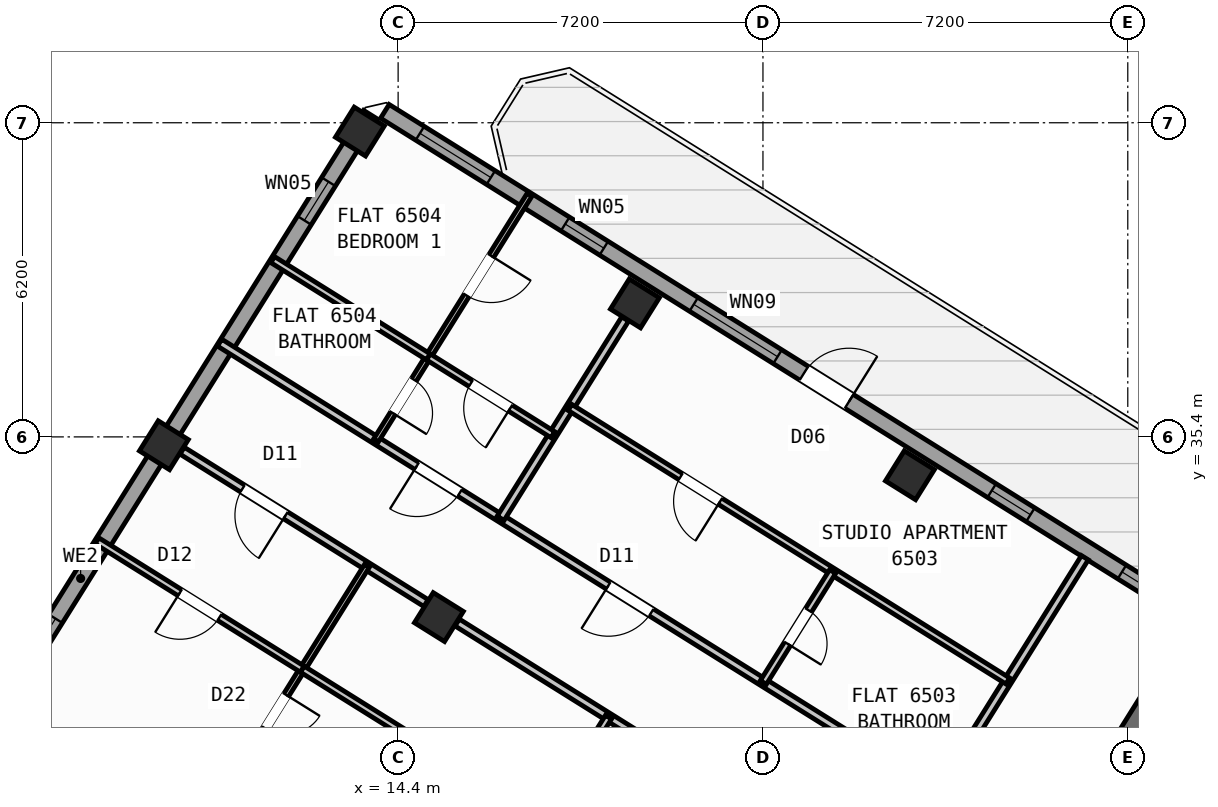
"""IFC4 building model, lengths in metres.
Left out: names, types, materials, properties, quantities, classifications, styles, units other than length and angle.
Written with IfcOpenShell. Run it as: python <this file> out.ifc"""

import sys

from ifc_helpers import new_model, si_unit, direction, frame, frame_2d, origin, origin_2d, place, context, subcontext, project, spatial, rectangle, hollow_rectangle, extrude, source, transform, mapped, element, fill, save


model = new_model("IFC4")
c1 = context("Model", 3, precision=1e-05, world=origin(), true_north=direction((0.0, 1.0)))
c2 = subcontext(c1, "Body", "Model", "MODEL_VIEW")
j1 = project(units=[si_unit("LENGTHUNIT", "METRE"), si_unit("PLANEANGLEUNIT", "RADIAN")], contexts=[c1])
p1 = place(None, origin())
s1 = spatial("IfcSite", under=j1, at=p1, CompositionType="ELEMENT")
p2 = place(p1, origin())
s2 = spatial("IfcBuilding", under=s1, at=p2, CompositionType="ELEMENT")
p3 = place(p2, frame((0.0, 0.0, 259.2)))
s3 = spatial("IfcBuildingStorey", under=s2, at=p3, CompositionType="ELEMENT", Elevation=259.2)
p4 = place(p3, frame((29.544, 30.636, 0.0), z_axis=(0.0, 0.0, 1.0), x_axis=(-0.529902075036, -0.848058836916, 0.0)))
e1 = element("IfcWall", 1, at=p4, inside=s3, PredefinedType="SHEAR", context=c2, shape_type="SweptSolid", body=[
    extrude(rectangle(XDim=3.625, YDim=0.45, at=frame_2d((1.812, 0.0))), origin(), (0.0, 0.0, 1.0), 3.35),
])
m1 = source(origin(), c2, "Body", "SweptSolid", [
    extrude(hollow_rectangle(XDim=0.7, YDim=0.7, WallThickness=0.028, at=origin_2d()), origin(), (0.0, 0.0, 1.0), 3.6),
])
for number, where, z_axis, x_axis in (
    (2, (24.5, 34.643, 0.0), (0.0, 0.0, 1.0), (-0.848, 0.53, 0.0)),
    (3, (19.073, 38.034, 0.0), (0.0, 0.0, 1.0), (-0.848, 0.53, 0.0)),
    (4, (15.205, 31.844, 0.0), (0.0, 0.0, 1.0), (-0.848, 0.53, 0.0)),
    (5, (13.646, 41.426, 0.0), (0.0, 0.0, 1.0), (-0.848, 0.53, 0.0)),
    (6, (9.777, 35.235, 0.0), (0.0, 0.0, 1.0), (-0.848, 0.53, 0.0)),
):
    element("IfcColumn", number, at=place(p3, frame(where, z_axis=z_axis, x_axis=x_axis)), inside=s3, PredefinedType="COLUMN", context=c2, shape_type="MappedRepresentation", body=[
        mapped(m1, transform((0.0, 0.0, 0.0), scale=1.0)),
    ])
p5 = place(p3, frame((2.415, 23.452, 0.0), z_axis=(0.0, 0.0, 1.0), x_axis=(0.52991049553, 0.848053575387, 0.0)))
e7 = element("IfcWall", 7, at=p5, inside=s3, PredefinedType="STANDARD", context=c2, shape_type="SweptSolid", body=[
    extrude(rectangle(XDim=21.587, YDim=0.32, at=frame_2d((10.794, 0.0))), origin(), (0.0, 0.0, 1.0), 2.875),
])
p6 = place(p5, frame((2.606, 0.0, 0.9)))
e8 = element("IfcOpeningElement", 8, at=p6, cuts=e7, PredefinedType="OPENING", context=c2, shape_type="SweptSolid", body=[
    extrude(rectangle(XDim=1.65, YDim=1.45, at=frame_2d((0.825, 0.725))), frame((0.0, 0.17, 0.0), z_axis=(0.0, -1.0, 0.0), x_axis=(1.0, 0.0, 0.0)), (0.0, 0.0, 1.0), 0.34),
])
p7 = place(p5, frame((8.509, 0.0, 0.9)))
e9 = element("IfcOpeningElement", 9, at=p7, cuts=e7, PredefinedType="OPENING", context=c2, shape_type="SweptSolid", body=[
    extrude(rectangle(XDim=1.35, YDim=1.45, at=frame_2d((0.675, 0.725))), frame((0.0, 0.17, 0.0), z_axis=(0.0, -1.0, 0.0), x_axis=(1.0, 0.0, 0.0)), (0.0, 0.0, 1.0), 0.34),
])
p8 = place(p5, frame((19.126, 0.0, 1.0)))
e10 = element("IfcOpeningElement", 10, at=p8, cuts=e7, PredefinedType="OPENING", context=c2, shape_type="SweptSolid", body=[
    extrude(rectangle(XDim=0.9, YDim=1.25, at=frame_2d((0.45, 0.625))), frame((0.0, 0.17, 0.0), z_axis=(0.0, -1.0, 0.0), x_axis=(1.0, 0.0, 0.0)), (0.0, 0.0, 1.0), 0.34),
])
p9 = place(p3, frame((14.138, 41.825, 0.0), z_axis=(0.0, 0.0, 1.0), x_axis=(0.848046498049, -0.529921821731, 0.0)))
e11 = element("IfcWall", 11, at=p9, inside=s3, PredefinedType="STANDARD", context=c2, shape_type="SweptSolid", body=[
    extrude(rectangle(XDim=31.588, YDim=0.32, at=frame_2d((15.794, 0.0))), origin(), (0.0, 0.0, 1.0), 3.35),
])
p10 = place(p9, frame((9.753, 0.0, 0.0)))
e12 = element("IfcOpeningElement", 12, at=p10, cuts=e11, PredefinedType="OPENING", context=c2, shape_type="SweptSolid", body=[
    extrude(rectangle(XDim=1.05, YDim=2.15, at=frame_2d((0.525, 1.075))), frame((0.0, 0.17, 0.0), z_axis=(0.0, -1.0, 0.0), x_axis=(1.0, 0.0, 0.0)), (0.0, 0.0, 1.0), 0.34),
])
p11 = place(p9, frame((0.816, 0.0, 0.9)))
e13 = element("IfcOpeningElement", 13, at=p11, cuts=e11, PredefinedType="OPENING", context=c2, shape_type="SweptSolid", body=[
    extrude(rectangle(XDim=1.65, YDim=1.45, at=frame_2d((0.825, 0.725))), frame((0.0, 0.17, 0.0), z_axis=(0.0, -1.0, 0.0), x_axis=(1.0, 0.0, 0.0)), (0.0, 0.0, 1.0), 0.34),
])
p12 = place(p9, frame((4.196, 0.0, 1.0)))
e14 = element("IfcOpeningElement", 14, at=p12, cuts=e11, PredefinedType="OPENING", context=c2, shape_type="SweptSolid", body=[
    extrude(rectangle(XDim=0.9, YDim=1.25, at=frame_2d((0.45, 0.625))), frame((0.0, 0.17, 0.0), z_axis=(0.0, -1.0, 0.0), x_axis=(1.0, 0.0, 0.0)), (0.0, 0.0, 1.0), 0.34),
])
p13 = place(p9, frame((7.188, 0.0, 0.95)))
e15 = element("IfcOpeningElement", 15, at=p13, cuts=e11, PredefinedType="OPENING", context=c2, shape_type="SweptSolid", body=[
    extrude(rectangle(XDim=1.95, YDim=1.35, at=frame_2d((0.975, 0.675))), frame((0.0, 0.17, 0.0), z_axis=(0.0, -1.0, 0.0), x_axis=(1.0, 0.0, 0.0)), (0.0, 0.0, 1.0), 0.34),
])
p14 = place(p9, frame((14.124, 0.0, 1.0)))
e16 = element("IfcOpeningElement", 16, at=p14, cuts=e11, PredefinedType="OPENING", context=c2, shape_type="SweptSolid", body=[
    extrude(rectangle(XDim=0.9, YDim=1.25, at=frame_2d((0.45, 0.625))), frame((0.0, 0.17, 0.0), z_axis=(0.0, -1.0, 0.0), x_axis=(1.0, 0.0, 0.0)), (0.0, 0.0, 1.0), 0.34),
])
p15 = place(p9, frame((17.154, 0.0, 1.0)))
e17 = element("IfcOpeningElement", 17, at=p15, cuts=e11, PredefinedType="OPENING", context=c2, shape_type="SweptSolid", body=[
    extrude(rectangle(XDim=0.9, YDim=1.25, at=frame_2d((0.45, 0.625))), frame((0.0, 0.17, 0.0), z_axis=(0.0, -1.0, 0.0), x_axis=(1.0, 0.0, 0.0)), (0.0, 0.0, 1.0), 0.34),
])
p16 = place(p9, frame((21.869, 0.0, 0.9)))
e18 = element("IfcOpeningElement", 18, at=p16, cuts=e11, PredefinedType="OPENING", context=c2, shape_type="SweptSolid", body=[
    extrude(rectangle(XDim=1.35, YDim=1.45, at=frame_2d((0.675, 0.725))), frame((0.0, 0.17, 0.0), z_axis=(0.0, -1.0, 0.0), x_axis=(1.0, 0.0, 0.0)), (0.0, 0.0, 1.0), 0.34),
])
p17 = place(p9, frame((27.569, 0.0, 0.9)))
e19 = element("IfcOpeningElement", 19, at=p17, cuts=e11, PredefinedType="OPENING", context=c2, shape_type="SweptSolid", body=[
    extrude(rectangle(XDim=1.35, YDim=1.45, at=frame_2d((0.675, 0.725))), frame((0.0, 0.17, 0.0), z_axis=(0.0, -1.0, 0.0), x_axis=(1.0, 0.0, 0.0)), (0.0, 0.0, 1.0), 0.34),
])
p18 = place(p3, frame((27.953, 33.016, 0.0), z_axis=(0.0, 0.0, 1.0), x_axis=(-0.529906322364, -0.848056182997, 0.0)))
e20 = element("IfcWall", 20, at=p18, inside=s3, PredefinedType="PARTITIONING", context=c2, shape_type="SweptSolid", body=[
    extrude(rectangle(XDim=5.45, YDim=0.16, at=frame_2d((2.725, 0.0))), origin(), (0.0, 0.0, 1.0), 3.34),
])
p19 = place(p3, frame((25.065, 28.394, 0.0), z_axis=(0.0, 0.0, 1.0), x_axis=(-0.848048310262, 0.529918921593, 0.0)))
e21 = element("IfcWall", 21, at=p19, inside=s3, PredefinedType="PARTITIONING", context=c2, shape_type="SweptSolid", body=[
    extrude(rectangle(XDim=16.73, YDim=0.16, at=frame_2d((8.365, 0.0))), origin(), (0.0, 0.0, 1.0), 3.34),
])
p20 = place(p19, frame((6.683, 0.0, 0.0)))
e22 = element("IfcOpeningElement", 22, at=p20, cuts=e21, PredefinedType="OPENING", context=c2, shape_type="SweptSolid", body=[
    extrude(rectangle(XDim=1.0, YDim=2.1, at=frame_2d((0.5, 1.05))), frame((0.0, 0.09, 0.0), z_axis=(0.0, -1.0, 0.0), x_axis=(1.0, 0.0, 0.0)), (0.0, 0.0, 1.0), 0.18),
])
p21 = place(p19, frame((11.14, 0.0, 0.0)))
e23 = element("IfcOpeningElement", 23, at=p21, cuts=e21, PredefinedType="OPENING", context=c2, shape_type="SweptSolid", body=[
    extrude(rectangle(XDim=1.0, YDim=2.1, at=frame_2d((0.5, 1.05))), frame((0.0, 0.09, 0.0), z_axis=(0.0, -1.0, 0.0), x_axis=(1.0, 0.0, 0.0)), (0.0, 0.0, 1.0), 0.18),
])
p22 = place(p3, frame((20.378, 28.729, 0.0), z_axis=(0.0, 0.0, 1.0), x_axis=(-0.848046629825, 0.529921610846, 0.0)))
e24 = element("IfcWall", 24, at=p22, inside=s3, PredefinedType="PARTITIONING", context=c2, shape_type="SweptSolid", body=[
    extrude(rectangle(XDim=5.676, YDim=0.16, at=frame_2d((2.838, 0.0))), origin(), (0.0, 0.0, 1.0), 2.875),
])
p23 = place(p3, frame((14.95, 32.12, 0.0), z_axis=(0.0, 0.0, 1.0), x_axis=(-0.848046629825, 0.529921610846, 0.0)))
e25 = element("IfcWall", 25, at=p23, inside=s3, PredefinedType="PARTITIONING", context=c2, shape_type="SweptSolid", body=[
    extrude(rectangle(XDim=5.676, YDim=0.16, at=frame_2d((2.838, 0.0))), origin(), (0.0, 0.0, 1.0), 2.875),
])
p24 = place(p23, frame((3.268, 0.0, 0.0)))
e26 = element("IfcOpeningElement", 26, at=p24, cuts=e25, PredefinedType="OPENING", context=c2, shape_type="SweptSolid", body=[
    extrude(rectangle(XDim=1.0, YDim=2.1, at=frame_2d((0.5, 1.05))), frame((0.0, 0.09, 0.0), z_axis=(0.0, -1.0, 0.0), x_axis=(1.0, 0.0, 0.0)), (0.0, 0.0, 1.0), 0.18),
])
p25 = place(p3, frame((13.782, 32.85, 0.0), z_axis=(0.0, 0.0, 1.0), x_axis=(-0.529928444178, -0.848042359821, 0.0)))
e27 = element("IfcWall", 27, at=p25, inside=s3, PredefinedType="PARTITIONING", context=c2, shape_type="SweptSolid", body=[
    extrude(rectangle(XDim=14.32, YDim=0.11, at=frame_2d((7.16, 0.0))), origin(), (0.0, 0.0, 1.0), 3.34),
])
p26 = place(p25, frame((3.0, 0.0, 0.0)))
e28 = element("IfcOpeningElement", 28, at=p26, cuts=e27, PredefinedType="OPENING", context=c2, shape_type="SweptSolid", body=[
    extrude(rectangle(XDim=0.78, YDim=2.05, at=frame_2d((0.39, 1.025))), frame((0.0, 0.065, 0.0), z_axis=(0.0, -1.0, 0.0), x_axis=(1.0, 0.0, 0.0)), (0.0, 0.0, 1.0), 0.13),
])
p27 = place(p3, frame((12.51, 30.815, 0.0), z_axis=(0.0, 0.0, 1.0), x_axis=(-0.848041344127, 0.529930069585, 0.0)))
e29 = element("IfcWall", 29, at=p27, inside=s3, PredefinedType="PLUMBINGWALL", context=c2, shape_type="SweptSolid", body=[
    extrude(rectangle(XDim=4.78, YDim=0.14, at=frame_2d((2.39, 0.0))), origin(), (0.0, 0.0, 1.0), 3.34),
])
p28 = place(p27, frame((1.93, 0.0, 0.0)))
e30 = element("IfcOpeningElement", 30, at=p28, cuts=e29, PredefinedType="OPENING", context=c2, shape_type="SweptSolid", body=[
    extrude(rectangle(XDim=0.92, YDim=2.08, at=frame_2d((0.46, 1.04))), frame((0.0, 0.08, 0.0), z_axis=(0.0, -1.0, 0.0), x_axis=(1.0, 0.0, 0.0)), (0.0, 0.0, 1.0), 0.16),
])
p29 = place(p3, frame((19.413, 26.501, 0.0), z_axis=(0.0, 0.0, 1.0), x_axis=(-0.84804547861, 0.52992345316, 0.0)))
e31 = element("IfcWall", 31, at=p29, inside=s3, PredefinedType="PLUMBINGWALL", context=c2, shape_type="SweptSolid", body=[
    extrude(rectangle(XDim=8.14, YDim=0.14, at=frame_2d((4.07, 0.0))), origin(), (0.0, 0.0, 1.0), 3.34),
])
p30 = place(p29, frame((4.887, 0.0, 0.0)))
e32 = element("IfcOpeningElement", 32, at=p30, cuts=e31, PredefinedType="OPENING", context=c2, shape_type="SweptSolid", body=[
    extrude(rectangle(XDim=0.78, YDim=2.05, at=frame_2d((0.39, 1.025))), frame((0.0, 0.08, 0.0), z_axis=(0.0, -1.0, 0.0), x_axis=(1.0, 0.0, 0.0)), (0.0, 0.0, 1.0), 0.16),
])
p31 = place(p29, frame((0.817, 0.0, 0.0)))
e33 = element("IfcOpeningElement", 33, at=p31, cuts=e31, PredefinedType="OPENING", context=c2, shape_type="SweptSolid", body=[
    extrude(rectangle(XDim=0.78, YDim=2.05, at=frame_2d((0.39, 1.025))), frame((0.0, 0.08, 0.0), z_axis=(0.0, -1.0, 0.0), x_axis=(1.0, 0.0, 0.0)), (0.0, 0.0, 1.0), 0.16),
])
p32 = place(p3, frame((18.552, 29.87, 0.0), z_axis=(0.0, 0.0, 1.0), x_axis=(-0.529935194983, -0.848038141311, 0.0)))
e34 = element("IfcWall", 34, at=p32, inside=s3, PredefinedType="PLUMBINGWALL", context=c2, shape_type="SweptSolid", body=[
    extrude(rectangle(XDim=2.41, YDim=0.14, at=frame_2d((1.205, 0.0))), origin(), (0.0, 0.0, 1.0), 3.34),
])
p33 = place(p3, frame((18.881, 37.727, 0.0), z_axis=(0.0, 0.0, 1.0), x_axis=(-0.529932694064, -0.848039704119, 0.0)))
e35 = element("IfcWall", 35, at=p33, inside=s3, PredefinedType="PARTITIONING", context=c2, shape_type="SweptSolid", body=[
    extrude(rectangle(XDim=4.638, YDim=0.16, at=frame_2d((2.319, 0.0))), origin(), (0.0, 0.0, 1.0), 2.875),
])
p34 = place(p3, frame((26.432, 30.582, 0.0), z_axis=(0.0, 0.0, 1.0), x_axis=(-0.848057523537, 0.529904176971, 0.0)))
e36 = element("IfcWall", 36, at=p34, inside=s3, PredefinedType="PLUMBINGWALL", context=c2, shape_type="SweptSolid", body=[
    extrude(rectangle(XDim=10.19, YDim=0.14, at=frame_2d((5.095, 0.0))), origin(), (0.0, 0.0, 1.0), 3.34),
])
p35 = place(p34, frame((6.693, 0.0, 0.0)))
e37 = element("IfcOpeningElement", 37, at=p35, cuts=e36, PredefinedType="OPENING", context=c2, shape_type="SweptSolid", body=[
    extrude(rectangle(XDim=0.92, YDim=2.08, at=frame_2d((0.46, 1.04))), frame((0.0, 0.08, 0.0), z_axis=(0.0, -1.0, 0.0), x_axis=(1.0, 0.0, 0.0)), (0.0, 0.0, 1.0), 0.16),
])
p36 = place(p3, frame((22.976, 32.742, 0.0), z_axis=(0.0, 0.0, 1.0), x_axis=(-0.529913878929, -0.848051461244, 0.0)))
e38 = element("IfcWall", 38, at=p36, inside=s3, PredefinedType="PLUMBINGWALL", context=c2, shape_type="SweptSolid", body=[
    extrude(rectangle(XDim=2.58, YDim=0.14, at=frame_2d((1.29, 0.0))), origin(), (0.0, 0.0, 1.0), 3.34),
])
p37 = place(p36, frame((0.9, 0.0, 0.0)))
e39 = element("IfcOpeningElement", 39, at=p37, cuts=e38, PredefinedType="OPENING", context=c2, shape_type="SweptSolid", body=[
    extrude(rectangle(XDim=0.78, YDim=2.05, at=frame_2d((0.39, 1.025))), frame((0.0, 0.08, 0.0), z_axis=(0.0, -1.0, 0.0), x_axis=(1.0, 0.0, 0.0)), (0.0, 0.0, 1.0), 0.16),
])
p38 = place(p3, frame((16.995, 40.182, 0.0), z_axis=(0.0, 0.0, 1.0), x_axis=(-0.529903020922, -0.848058245888, 0.0)))
e40 = element("IfcWall", 40, at=p38, inside=s3, PredefinedType="PARTITIONING", context=c2, shape_type="SweptSolid", body=[
    extrude(rectangle(XDim=5.72, YDim=0.11, at=frame_2d((2.86, 0.0))), origin(), (0.0, 0.0, 1.0), 3.34),
])
p39 = place(p38, frame((4.308, 0.0, 0.0)))
e41 = element("IfcOpeningElement", 41, at=p39, cuts=e40, PredefinedType="OPENING", context=c2, shape_type="SweptSolid", body=[
    extrude(rectangle(XDim=0.78, YDim=2.05, at=frame_2d((0.39, 1.025))), frame((0.0, 0.065, 0.0), z_axis=(0.0, -1.0, 0.0), x_axis=(1.0, 0.0, 0.0)), (0.0, 0.0, 1.0), 0.13),
])
p40 = place(p38, frame((1.427, 0.0, 0.0)))
e42 = element("IfcOpeningElement", 42, at=p40, cuts=e40, PredefinedType="OPENING", context=c2, shape_type="SweptSolid", body=[
    extrude(rectangle(XDim=0.92, YDim=2.08, at=frame_2d((0.46, 1.04))), frame((0.0, 0.065, 0.0), z_axis=(0.0, -1.0, 0.0), x_axis=(1.0, 0.0, 0.0)), (0.0, 0.0, 1.0), 0.13),
])
p41 = place(p3, frame((17.454, 35.444, 0.0), z_axis=(0.0, 0.0, 1.0), x_axis=(-0.848083424339, 0.529862723128, 0.0)))
e43 = element("IfcWall", 43, at=p41, inside=s3, PredefinedType="PLUMBINGWALL", context=c2, shape_type="SweptSolid", body=[
    extrude(rectangle(XDim=2.9, YDim=0.14, at=frame_2d((1.45, 0.0))), origin(), (0.0, 0.0, 1.0), 3.34),
])
p42 = place(p41, frame((0.99, 0.0, 0.0)))
e44 = element("IfcOpeningElement", 44, at=p42, cuts=e43, PredefinedType="OPENING", context=c2, shape_type="SweptSolid", body=[
    extrude(rectangle(XDim=0.92, YDim=2.08, at=frame_2d((0.46, 1.04))), frame((0.0, 0.08, 0.0), z_axis=(0.0, -1.0, 0.0), x_axis=(1.0, 0.0, 0.0)), (0.0, 0.0, 1.0), 0.16),
])
p43 = place(p3, frame((14.995, 36.98, 0.0), z_axis=(0.0, 0.0, 1.0), x_axis=(-0.848021036626, 0.529962566074, 0.0)))
e45 = element("IfcWall", 45, at=p43, inside=s3, PredefinedType="PLUMBINGWALL", context=c2, shape_type="SweptSolid", body=[
    extrude(rectangle(XDim=3.62, YDim=0.14, at=frame_2d((1.81, 0.0))), origin(), (0.0, 0.0, 1.0), 3.34),
])
m2 = source(origin(), c2, "Body", "SweptSolid", [
    extrude(rectangle(XDim=1.05, YDim=2.15, at=frame_2d((0.525, 1.075))), frame((0.0, 0.025, 0.0), z_axis=(0.0, -1.0, 0.0), x_axis=(1.0, 0.0, 0.0)), (0.0, 0.0, 1.0), 0.05),
])
p44 = place(p10, origin())
e46 = element("IfcDoor", 46, at=p44, inside=s3, OperationType="SINGLE_SWING_RIGHT", PredefinedType="DOOR", context=c2, shape_type="MappedRepresentation", body=[
    mapped(m2, transform((0.0, 0.0, 0.0), scale=1.0)),
])
fill(e12, e46)
m3 = source(origin(), c2, "Body", "SweptSolid", [
    extrude(rectangle(XDim=1.35, YDim=1.45, at=frame_2d((0.675, 0.725))), frame((0.0, 0.03, 0.0), z_axis=(0.0, -1.0, 0.0), x_axis=(1.0, 0.0, 0.0)), (0.0, 0.0, 1.0), 0.06),
])
p45 = place(p7, origin())
e47 = element("IfcWindow", 47, at=p45, inside=s3, PartitioningType="SINGLE_PANEL", PredefinedType="WINDOW", context=c2, shape_type="MappedRepresentation", body=[
    mapped(m3, transform((0.0, 0.0, 0.0), scale=1.0)),
])
fill(e9, e47)
m4 = source(origin(), c2, "Body", "SweptSolid", [
    extrude(rectangle(XDim=0.9, YDim=1.25, at=frame_2d((0.45, 0.625))), frame((0.0, 0.03, 0.0), z_axis=(0.0, -1.0, 0.0), x_axis=(1.0, 0.0, 0.0)), (0.0, 0.0, 1.0), 0.06),
])
p46 = place(p8, origin())
e48 = element("IfcWindow", 48, at=p46, inside=s3, PartitioningType="SINGLE_PANEL", PredefinedType="WINDOW", context=c2, shape_type="MappedRepresentation", body=[
    mapped(m4, transform((0.0, 0.0, 0.0), scale=1.0)),
])
fill(e10, e48)
m5 = source(origin(), c2, "Body", "SweptSolid", [
    extrude(rectangle(XDim=1.65, YDim=1.45, at=frame_2d((0.825, 0.725))), frame((0.0, 0.03, 0.0), z_axis=(0.0, -1.0, 0.0), x_axis=(1.0, 0.0, 0.0)), (0.0, 0.0, 1.0), 0.06),
])
p47 = place(p11, origin())
e49 = element("IfcWindow", 49, at=p47, inside=s3, PartitioningType="SINGLE_PANEL", PredefinedType="WINDOW", context=c2, shape_type="MappedRepresentation", body=[
    mapped(m5, transform((0.0, 0.0, 0.0), scale=1.0)),
])
fill(e13, e49)
p48 = place(p12, origin())
e50 = element("IfcWindow", 50, at=p48, inside=s3, PartitioningType="SINGLE_PANEL", PredefinedType="WINDOW", context=c2, shape_type="MappedRepresentation", body=[
    mapped(m4, transform((0.0, 0.0, 0.0), scale=1.0)),
])
fill(e14, e50)
m6 = source(origin(), c2, "Body", "SweptSolid", [
    extrude(rectangle(XDim=1.95, YDim=1.35, at=frame_2d((0.975, 0.675))), frame((0.0, 0.03, 0.0), z_axis=(0.0, -1.0, 0.0), x_axis=(1.0, 0.0, 0.0)), (0.0, 0.0, 1.0), 0.06),
])
p49 = place(p13, origin())
e51 = element("IfcWindow", 51, at=p49, inside=s3, PartitioningType="SINGLE_PANEL", PredefinedType="WINDOW", context=c2, shape_type="MappedRepresentation", body=[
    mapped(m6, transform((0.0, 0.0, 0.0), scale=1.0)),
])
fill(e15, e51)
p50 = place(p14, origin())
e52 = element("IfcWindow", 52, at=p50, inside=s3, PartitioningType="SINGLE_PANEL", PredefinedType="WINDOW", context=c2, shape_type="MappedRepresentation", body=[
    mapped(m4, transform((0.0, 0.0, 0.0), scale=1.0)),
])
fill(e16, e52)
p51 = place(p15, origin())
e53 = element("IfcWindow", 53, at=p51, inside=s3, PartitioningType="SINGLE_PANEL", PredefinedType="WINDOW", context=c2, shape_type="MappedRepresentation", body=[
    mapped(m4, transform((0.0, 0.0, 0.0), scale=1.0)),
])
fill(e17, e53)
m7 = source(origin(), c2, "Body", "SweptSolid", [
    extrude(rectangle(XDim=1.0, YDim=2.1, at=frame_2d((0.5, 1.05))), frame((0.0, 0.025, 0.0), z_axis=(0.0, -1.0, 0.0), x_axis=(1.0, 0.0, 0.0)), (0.0, 0.0, 1.0), 0.05),
])
p52 = place(p24, origin())
e54 = element("IfcDoor", 54, at=p52, inside=s3, OperationType="SINGLE_SWING_LEFT", PredefinedType="DOOR", context=c2, shape_type="MappedRepresentation", body=[
    mapped(m7, transform((0.0, 0.0, 0.0), scale=1.0)),
])
fill(e26, e54)
m8 = source(origin(), c2, "Body", "SweptSolid", [
    extrude(rectangle(XDim=0.92, YDim=2.08, at=frame_2d((0.46, 1.04))), frame((0.0, 0.025, 0.0), z_axis=(0.0, -1.0, 0.0), x_axis=(1.0, 0.0, 0.0)), (0.0, 0.0, 1.0), 0.05),
])
p53 = place(p28, origin())
e55 = element("IfcDoor", 55, at=p53, inside=s3, OperationType="SINGLE_SWING_RIGHT", PredefinedType="DOOR", context=c2, shape_type="MappedRepresentation", body=[
    mapped(m8, transform((0.0, 0.0, 0.0), scale=1.0)),
])
fill(e30, e55)
m9 = source(origin(), c2, "Body", "SweptSolid", [
    extrude(rectangle(XDim=0.78, YDim=2.05, at=frame_2d((0.39, 1.025))), frame((0.0, 0.025, 0.0), z_axis=(0.0, -1.0, 0.0), x_axis=(1.0, 0.0, 0.0)), (0.0, 0.0, 1.0), 0.05),
])
p54 = place(p26, origin())
e56 = element("IfcDoor", 56, at=p54, inside=s3, OperationType="SINGLE_SWING_LEFT", PredefinedType="DOOR", context=c2, shape_type="MappedRepresentation", body=[
    mapped(m9, transform((0.0, 0.0, 0.0), scale=1.0)),
])
fill(e28, e56)
p55 = place(p20, origin())
e57 = element("IfcDoor", 57, at=p55, inside=s3, OperationType="SINGLE_SWING_RIGHT", PredefinedType="DOOR", context=c2, shape_type="MappedRepresentation", body=[
    mapped(m7, transform((0.0, 0.0, 0.0), scale=1.0)),
])
fill(e22, e57)
p56 = place(p35, origin())
e58 = element("IfcDoor", 58, at=p56, inside=s3, OperationType="SINGLE_SWING_LEFT", PredefinedType="DOOR", context=c2, shape_type="MappedRepresentation", body=[
    mapped(m8, transform((0.0, 0.0, 0.0), scale=1.0)),
])
fill(e37, e58)
p57 = place(p37, origin())
e59 = element("IfcDoor", 59, at=p57, inside=s3, OperationType="SINGLE_SWING_RIGHT", PredefinedType="DOOR", context=c2, shape_type="MappedRepresentation", body=[
    mapped(m9, transform((0.0, 0.0, 0.0), scale=1.0)),
])
fill(e39, e59)
p58 = place(p21, origin())
e60 = element("IfcDoor", 60, at=p58, inside=s3, OperationType="SINGLE_SWING_RIGHT", PredefinedType="DOOR", context=c2, shape_type="MappedRepresentation", body=[
    mapped(m7, transform((0.0, 0.0, 0.0), scale=1.0)),
])
fill(e23, e60)
p59 = place(p42, origin())
e61 = element("IfcDoor", 61, at=p59, inside=s3, OperationType="SINGLE_SWING_LEFT", PredefinedType="DOOR", context=c2, shape_type="MappedRepresentation", body=[
    mapped(m8, transform((0.0, 0.0, 0.0), scale=1.0)),
])
fill(e44, e61)
p60 = place(p39, origin())
e62 = element("IfcDoor", 62, at=p60, inside=s3, OperationType="SINGLE_SWING_RIGHT", PredefinedType="DOOR", context=c2, shape_type="MappedRepresentation", body=[
    mapped(m9, transform((0.0, 0.0, 0.0), scale=1.0)),
])
fill(e41, e62)
p61 = place(p40, origin())
e63 = element("IfcDoor", 63, at=p61, inside=s3, OperationType="SINGLE_SWING_LEFT", PredefinedType="DOOR", context=c2, shape_type="MappedRepresentation", body=[
    mapped(m8, transform((0.0, 0.0, 0.0), scale=1.0)),
])
fill(e42, e63)
save(model, sys.argv[1])
